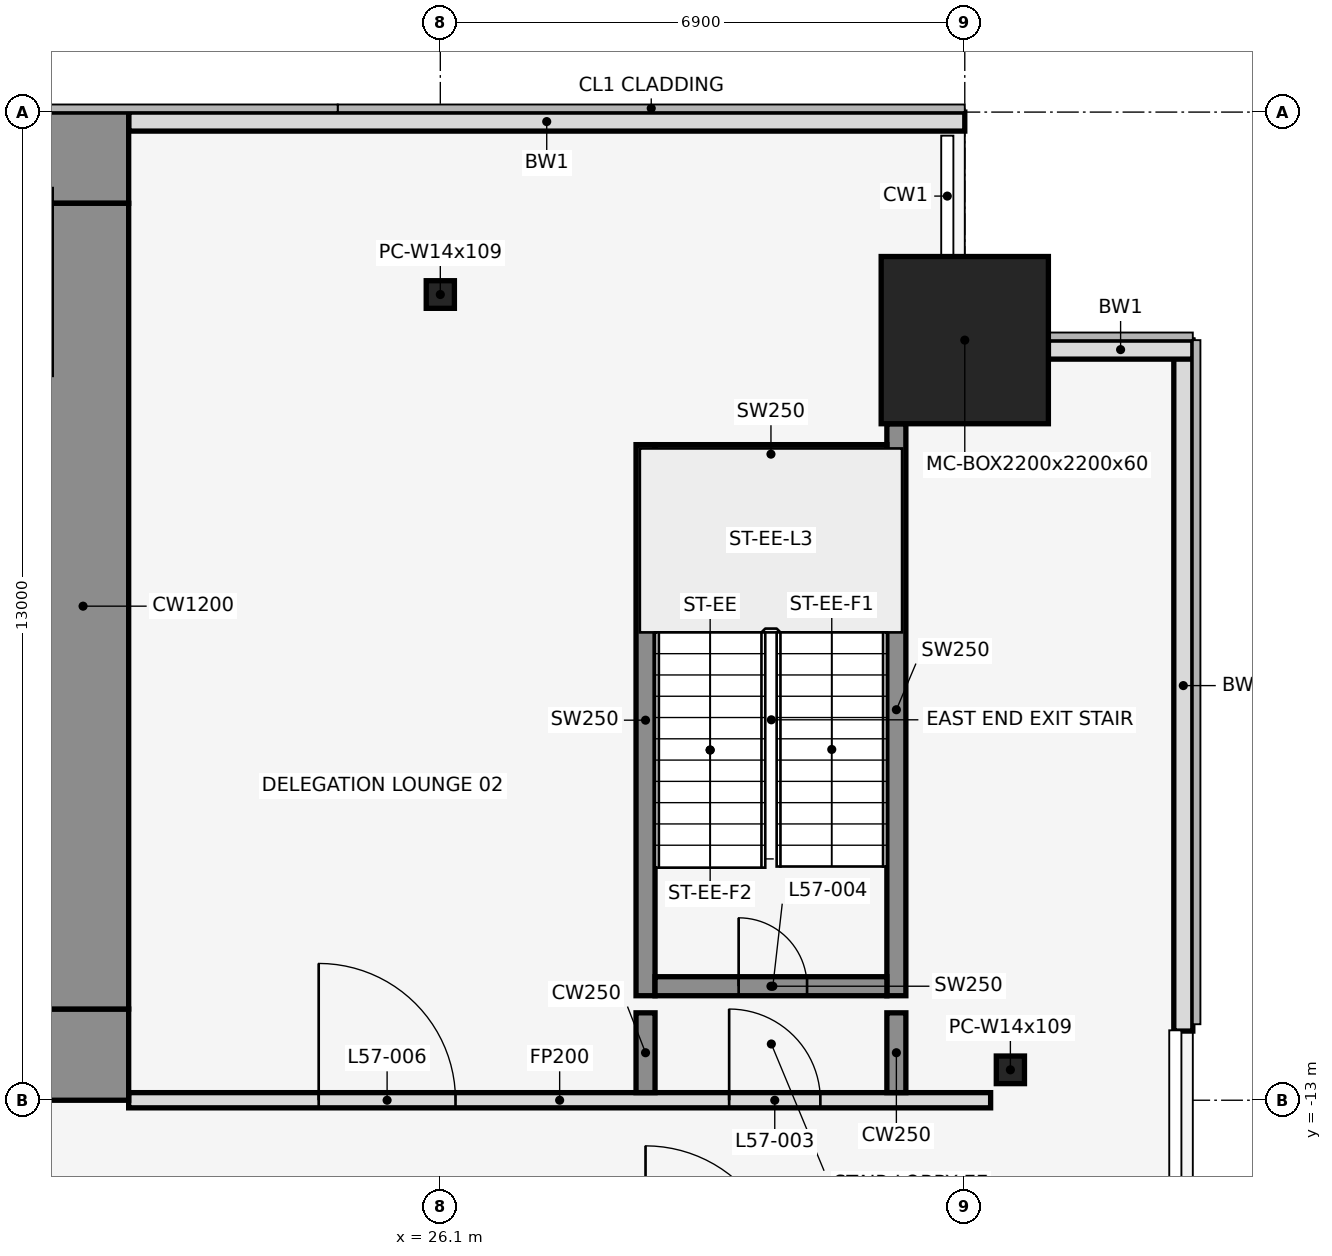
"""IFC4 building model, lengths in metres.
Left out: names, types, materials, properties, quantities, classifications, styles, units other than length and angle.
Written with IfcOpenShell. Run it as: python <this file> out.ifc"""

import sys

from ifc_helpers import new_model, si_unit, direction, frame, frame_2d, origin, origin_2d, place, context, subcontext, project, spatial, rectangle, hollow_rectangle, i_section, extrude, element, fill, save


model = new_model("IFC4")
c1 = context("Model", 3, precision=1e-05, world=origin(), true_north=direction((0.0, 1.0)))
c2 = subcontext(c1, "Body", "Model", "MODEL_VIEW")
j1 = project(units=[si_unit("LENGTHUNIT", "METRE"), si_unit("PLANEANGLEUNIT", "RADIAN")], contexts=[c1])
p1 = place(None, origin())
s1 = spatial("IfcSite", under=j1, at=p1, CompositionType="ELEMENT")
p2 = place(p1, origin())
s2 = spatial("IfcBuilding", under=s1, at=p2, CompositionType="ELEMENT")
p3 = place(p2, frame((0.0, 0.0, 254.0)))
s3 = spatial("IfcBuildingStorey", under=s2, at=p3, CompositionType="ELEMENT", Elevation=254.0)
p4 = place(p3, frame((26.1, -2.4, 0.0), z_axis=(0.0, 0.0, 1.0), x_axis=(1.0, 0.0, 0.0)))
e1 = element("IfcColumn", 1, at=p4, inside=s3, PredefinedType="COLUMN", context=c2, shape_type="SweptSolid", body=[
    extrude(i_section(OverallWidth=0.371, OverallDepth=0.363, WebThickness=0.013, FlangeThickness=0.022, at=origin_2d()), origin(), (0.0, 0.0, 1.0), 4.2),
])
p5 = place(p3, frame((33.0, -3.0, 0.0), z_axis=(0.0, 0.0, 1.0), x_axis=(1.0, 0.0, 0.0)))
e2 = element("IfcColumn", 2, at=p5, inside=s3, PredefinedType="COLUMN", context=c2, shape_type="SweptSolid", body=[
    extrude(hollow_rectangle(XDim=2.2, YDim=2.2, WallThickness=0.06, at=origin_2d()), origin(), (0.0, 0.0, 1.0), 4.2),
])
p6 = place(p3, frame((33.6, -12.6, 0.0), z_axis=(0.0, 0.0, 1.0), x_axis=(1.0, 0.0, 0.0)))
e3 = element("IfcColumn", 3, at=p6, inside=s3, PredefinedType="COLUMN", context=c2, shape_type="SweptSolid", body=[
    extrude(i_section(OverallWidth=0.371, OverallDepth=0.363, WebThickness=0.013, FlangeThickness=0.022, at=origin_2d()), origin(), (0.0, 0.0, 1.0), 4.2),
])
p7 = place(p3, frame((33.0, -0.125, 0.0), z_axis=(0.0, 0.0, 1.0), x_axis=(-1.0, 0.0, 0.0)))
e4 = element("IfcWall", 4, at=p7, inside=s3, PredefinedType="STANDARD", context=c2, shape_type="SweptSolid", body=[
    extrude(rectangle(XDim=11.0, YDim=0.25, at=frame_2d((5.5, 0.0))), origin(), (0.0, 0.0, 1.0), 4.05),
])
p8 = place(p3, frame((35.875, -12.09, 0.0), z_axis=(0.0, 0.0, 1.0), x_axis=(0.0, 1.0, 0.0)))
e5 = element("IfcWall", 5, at=p8, inside=s3, PredefinedType="STANDARD", context=c2, shape_type="SweptSolid", body=[
    extrude(rectangle(XDim=9.09, YDim=0.25, at=frame_2d((4.545, 0.0))), origin(), (0.0, 0.0, 1.0), 4.05),
])
p9 = place(p3, frame((36.0, -3.125, 0.0), z_axis=(0.0, 0.0, 1.0), x_axis=(-1.0, 0.0, 0.0)))
e6 = element("IfcWall", 6, at=p9, inside=s3, PredefinedType="STANDARD", context=c2, shape_type="SweptSolid", body=[
    extrude(rectangle(XDim=1.9, YDim=0.25, at=frame_2d((0.95, 0.0))), origin(), (0.0, 0.0, 1.0), 4.05),
])
p10 = place(p3, frame((28.8, -11.625, 0.0), z_axis=(0.0, 0.0, 1.0), x_axis=(0.0, 1.0, 0.0)))
e7 = element("IfcWall", 7, at=p10, inside=s3, PredefinedType="SHEAR", context=c2, shape_type="SweptSolid", body=[
    extrude(rectangle(XDim=7.25, YDim=0.25, at=frame_2d((3.625, 0.0))), origin(), (0.0, 0.0, 1.0), 4.2),
])
p11 = place(p3, frame((32.1, -11.625, 0.0), z_axis=(0.0, 0.0, 1.0), x_axis=(0.0, 1.0, 0.0)))
e8 = element("IfcWall", 8, at=p11, inside=s3, PredefinedType="SHEAR", context=c2, shape_type="SweptSolid", body=[
    extrude(rectangle(XDim=7.525, YDim=0.25, at=frame_2d((3.762, 0.0))), origin(), (0.0, 0.0, 1.0), 4.2),
])
p12 = place(p3, frame((28.925, -11.5, 0.0), z_axis=(0.0, 0.0, 1.0), x_axis=(1.0, 0.0, 0.0)))
e9 = element("IfcWall", 9, at=p12, inside=s3, PredefinedType="SHEAR", context=c2, shape_type="SweptSolid", body=[
    extrude(rectangle(XDim=3.05, YDim=0.25, at=frame_2d((1.525, 0.0))), origin(), (0.0, 0.0, 1.0), 4.2),
])
p13 = place(p12, frame((1.1, 0.0, 0.0)))
e10 = element("IfcOpeningElement", 10, at=p13, cuts=e9, PredefinedType="OPENING", context=c2, shape_type="SweptSolid", body=[
    extrude(rectangle(XDim=0.9, YDim=2.1, at=frame_2d((0.45, 1.05))), frame((0.0, 0.137, 0.0), z_axis=(0.0, -1.0, 0.0), x_axis=(1.0, 0.0, 0.0)), (0.0, 0.0, 1.0), 0.274),
])
p14 = place(p3, frame((28.925, -4.5, 0.0), z_axis=(0.0, 0.0, 1.0), x_axis=(1.0, 0.0, 0.0)))
e11 = element("IfcWall", 11, at=p14, inside=s3, PredefinedType="SHEAR", context=c2, shape_type="SweptSolid", body=[
    extrude(rectangle(XDim=3.05, YDim=0.25, at=frame_2d((1.525, 0.0))), origin(), (0.0, 0.0, 1.0), 4.2),
])
p15 = place(p3, frame((22.0, -13.0, 0.0), z_axis=(0.0, 0.0, 1.0), x_axis=(1.0, 0.0, 0.0)))
e12 = element("IfcWall", 12, at=p15, inside=s3, PredefinedType="PARTITIONING", context=c2, shape_type="SweptSolid", body=[
    extrude(rectangle(XDim=11.34, YDim=0.2, at=frame_2d((5.67, 0.0))), origin(), (0.0, 0.0, 1.0), 3.118),
])
p16 = place(p15, frame((7.9, 0.0, 0.0)))
e13 = element("IfcOpeningElement", 13, at=p16, cuts=e12, PredefinedType="OPENING", context=c2, shape_type="SweptSolid", body=[
    extrude(rectangle(XDim=1.2, YDim=2.1, at=frame_2d((0.6, 1.05))), frame((0.0, 0.112, 0.0), z_axis=(0.0, -1.0, 0.0), x_axis=(1.0, 0.0, 0.0)), (0.0, 0.0, 1.0), 0.224),
])
p17 = place(p15, frame((2.5, 0.0, 0.0)))
e14 = element("IfcOpeningElement", 14, at=p17, cuts=e12, PredefinedType="OPENING", context=c2, shape_type="SweptSolid", body=[
    extrude(rectangle(XDim=1.8, YDim=2.1, at=frame_2d((0.9, 1.05))), frame((0.0, 0.112, 0.0), z_axis=(0.0, -1.0, 0.0), x_axis=(1.0, 0.0, 0.0)), (0.0, 0.0, 1.0), 0.224),
])
for number, where, z_axis, x_axis in (
    (15, (28.8, -12.9, 0.0), (0.0, 0.0, 1.0), (0.0, 1.0, 0.0)),
    (16, (32.1, -12.9, 0.0), (0.0, 0.0, 1.0), (0.0, 1.0, 0.0)),
):
    element("IfcWall", number, at=place(p3, frame(where, z_axis=z_axis, x_axis=x_axis)), inside=s3, PredefinedType="SHEAR", context=c2, shape_type="SweptSolid", body=[
        extrude(rectangle(XDim=1.05, YDim=0.25, at=frame_2d((0.525, 0.0))), origin(), (0.0, 0.0, 1.0), 4.2),
    ])
p18 = place(p3, frame((-22.0, -0.6, 0.0), z_axis=(0.0, 0.0, 1.0), x_axis=(1.0, 0.0, 0.0)))
e17 = element("IfcWall", 17, at=p18, inside=s3, PredefinedType="SHEAR", context=c2, shape_type="SweptSolid", body=[
    extrude(rectangle(XDim=44.0, YDim=1.2, at=frame_2d((22.0, 0.0))), origin(), (0.0, 0.0, 1.0), 4.2),
])
p19 = place(p18, frame((18.55, 0.0, 0.0)))
e18 = element("IfcOpeningElement", 18, at=p19, cuts=e17, PredefinedType="OPENING", context=c2, shape_type="SweptSolid", body=[
    extrude(rectangle(XDim=0.9, YDim=2.1, at=frame_2d((0.45, 1.05))), frame((0.0, 0.612, 0.0), z_axis=(0.0, -1.0, 0.0), x_axis=(1.0, 0.0, 0.0)), (0.0, 0.0, 1.0), 1.224),
])
p20 = place(p18, frame((24.55, 0.0, 0.0)))
e19 = element("IfcOpeningElement", 19, at=p20, cuts=e17, PredefinedType="OPENING", context=c2, shape_type="SweptSolid", body=[
    extrude(rectangle(XDim=0.9, YDim=2.1, at=frame_2d((0.45, 1.05))), frame((0.0, 0.612, 0.0), z_axis=(0.0, -1.0, 0.0), x_axis=(1.0, 0.0, 0.0)), (0.0, 0.0, 1.0), 1.224),
])
p21 = place(p3, frame((-22.0, -12.4, 0.0), z_axis=(0.0, 0.0, 1.0), x_axis=(1.0, 0.0, 0.0)))
e20 = element("IfcWall", 20, at=p21, inside=s3, PredefinedType="SHEAR", context=c2, shape_type="SweptSolid", body=[
    extrude(rectangle(XDim=44.0, YDim=1.2, at=frame_2d((22.0, 0.0))), origin(), (0.0, 0.0, 1.0), 4.2),
])
p22 = place(p21, frame((2.2, 0.0, 0.0)))
e21 = element("IfcOpeningElement", 21, at=p22, cuts=e20, PredefinedType="OPENING", context=c2, shape_type="SweptSolid", body=[
    extrude(rectangle(XDim=1.2, YDim=2.1, at=frame_2d((0.6, 1.05))), frame((0.0, 0.612, 0.0), z_axis=(0.0, -1.0, 0.0), x_axis=(1.0, 0.0, 0.0)), (0.0, 0.0, 1.0), 1.224),
])
p23 = place(p21, frame((21.4, 0.0, 0.0)))
e22 = element("IfcOpeningElement", 22, at=p23, cuts=e20, PredefinedType="OPENING", context=c2, shape_type="SweptSolid", body=[
    extrude(rectangle(XDim=1.2, YDim=2.1, at=frame_2d((0.6, 1.05))), frame((0.0, 0.612, 0.0), z_axis=(0.0, -1.0, 0.0), x_axis=(1.0, 0.0, 0.0)), (0.0, 0.0, 1.0), 1.224),
])
p24 = place(p21, frame((40.6, 0.0, 0.0)))
e23 = element("IfcOpeningElement", 23, at=p24, cuts=e20, PredefinedType="OPENING", context=c2, shape_type="SweptSolid", body=[
    extrude(rectangle(XDim=1.2, YDim=2.1, at=frame_2d((0.6, 1.05))), frame((0.0, 0.612, 0.0), z_axis=(0.0, -1.0, 0.0), x_axis=(1.0, 0.0, 0.0)), (0.0, 0.0, 1.0), 1.224),
])
p25 = place(p21, frame((16.0, 0.0, 0.0)))
e24 = element("IfcOpeningElement", 24, at=p25, cuts=e20, PredefinedType="OPENING", context=c2, shape_type="SweptSolid", body=[
    extrude(rectangle(XDim=1.8, YDim=2.1, at=frame_2d((0.9, 1.05))), frame((0.0, 0.612, 0.0), z_axis=(0.0, -1.0, 0.0), x_axis=(1.0, 0.0, 0.0)), (0.0, 0.0, 1.0), 1.224),
])
p26 = place(p21, frame((6.3, 0.0, 0.0)))
e25 = element("IfcOpeningElement", 25, at=p26, cuts=e20, PredefinedType="OPENING", context=c2, shape_type="SweptSolid", body=[
    extrude(rectangle(XDim=1.2, YDim=2.1, at=frame_2d((0.6, 1.05))), frame((0.0, 0.612, 0.0), z_axis=(0.0, -1.0, 0.0), x_axis=(1.0, 0.0, 0.0)), (0.0, 0.0, 1.0), 1.224),
])
p27 = place(p21, frame((26.2, 0.0, 0.0)))
e26 = element("IfcOpeningElement", 26, at=p27, cuts=e20, PredefinedType="OPENING", context=c2, shape_type="SweptSolid", body=[
    extrude(rectangle(XDim=1.8, YDim=2.1, at=frame_2d((0.9, 1.05))), frame((0.0, 0.612, 0.0), z_axis=(0.0, -1.0, 0.0), x_axis=(1.0, 0.0, 0.0)), (0.0, 0.0, 1.0), 1.224),
])
p28 = place(p21, frame((36.5, 0.0, 0.0)))
e27 = element("IfcOpeningElement", 27, at=p28, cuts=e20, PredefinedType="OPENING", context=c2, shape_type="SweptSolid", body=[
    extrude(rectangle(XDim=1.2, YDim=2.1, at=frame_2d((0.6, 1.05))), frame((0.0, 0.612, 0.0), z_axis=(0.0, -1.0, 0.0), x_axis=(1.0, 0.0, 0.0)), (0.0, 0.0, 1.0), 1.224),
])
p29 = place(p3, frame((21.4, -11.8, 0.0), z_axis=(0.0, 0.0, 1.0), x_axis=(0.0, 1.0, 0.0)))
e28 = element("IfcWall", 28, at=p29, inside=s3, PredefinedType="SHEAR", context=c2, shape_type="SweptSolid", body=[
    extrude(rectangle(XDim=10.6, YDim=1.2, at=frame_2d((5.3, 0.0))), origin(), (0.0, 0.0, 1.0), 4.2),
])
p30 = place(p16, origin())
e29 = element("IfcDoor", 29, at=p30, inside=s3, OperationType="SINGLE_SWING_RIGHT", PredefinedType="DOOR", context=c2, shape_type="SweptSolid", body=[
    extrude(rectangle(XDim=1.2, YDim=2.1, at=frame_2d((0.6, 1.05))), frame((0.0, 0.025, 0.0), z_axis=(0.0, -1.0, 0.0), x_axis=(1.0, 0.0, 0.0)), (0.0, 0.0, 1.0), 0.05),
])
fill(e13, e29)
p31 = place(p13, origin())
e30 = element("IfcDoor", 30, at=p31, inside=s3, OperationType="SINGLE_SWING_LEFT", PredefinedType="DOOR", context=c2, shape_type="SweptSolid", body=[
    extrude(rectangle(XDim=0.9, YDim=2.1, at=frame_2d((0.45, 1.05))), frame((0.0, 0.025, 0.0), z_axis=(0.0, -1.0, 0.0), x_axis=(1.0, 0.0, 0.0)), (0.0, 0.0, 1.0), 0.05),
])
fill(e10, e30)
p32 = place(p17, origin())
e31 = element("IfcDoor", 31, at=p32, inside=s3, OperationType="SINGLE_SWING_LEFT", PredefinedType="DOOR", context=c2, shape_type="SweptSolid", body=[
    extrude(rectangle(XDim=1.8, YDim=2.1, at=frame_2d((0.9, 1.05))), frame((0.0, 0.025, 0.0), z_axis=(0.0, -1.0, 0.0), x_axis=(1.0, 0.0, 0.0)), (0.0, 0.0, 1.0), 0.05),
])
fill(e14, e31)
save(model, sys.argv[1])
